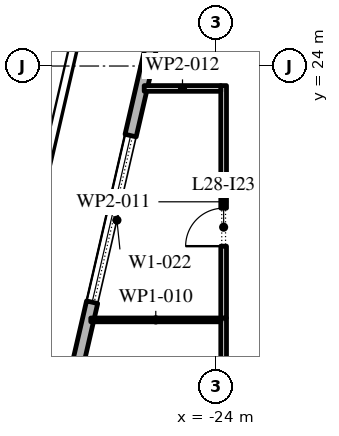
"""IFC4 building model, lengths in metres.
Left out: names, types, materials, properties, quantities, classifications, styles, units other than length and angle.
Written with IfcOpenShell. Run it as: python <this file> out.ifc"""

import sys

from ifc_helpers import new_model, si_unit, direction, frame, frame_2d, origin, place, context, subcontext, project, spatial, rectangle, extrude, element, fill, save


model = new_model("IFC4")
c1 = context("Model", 3, precision=1e-05, world=origin(), true_north=direction((0.0, 1.0)))
c2 = subcontext(c1, "Body", "Model", "MODEL_VIEW")
j1 = project(units=[si_unit("LENGTHUNIT", "METRE"), si_unit("PLANEANGLEUNIT", "RADIAN")], contexts=[c1])
p1 = place(None, origin())
s1 = spatial("IfcSite", under=j1, at=p1, CompositionType="ELEMENT")
p2 = place(p1, origin())
s2 = spatial("IfcBuilding", under=s1, at=p2, CompositionType="ELEMENT")
p3 = place(p2, frame((0.0, 0.0, 130.8)))
s3 = spatial("IfcBuildingStorey", under=s2, at=p3, CompositionType="ELEMENT", Elevation=130.8)
p4 = place(p3, frame((-22.82, 37.016, 0.0), z_axis=(0.0, 0.0, 1.0), x_axis=(-0.224953880882, -0.974369412223, 0.0)))
e1 = element("IfcWall", 1, at=p4, inside=s3, PredefinedType="STANDARD", context=c2, shape_type="SweptSolid", body=[
    extrude(rectangle(XDim=49.5, YDim=0.3, at=frame_2d((24.75, 0.0))), origin(), (0.0, 0.0, 1.0), 4.0),
])
p5 = place(p4, frame((1.157, 0.0, 0.45)))
e2 = element("IfcOpeningElement", 2, at=p5, cuts=e1, PredefinedType="OPENING", context=c2, shape_type="SweptSolid", body=[
    extrude(rectangle(XDim=4.5, YDim=3.05, at=frame_2d((2.25, 1.525))), frame((0.0, 0.16, 0.0), z_axis=(0.0, -1.0, 0.0), x_axis=(1.0, 0.0, 0.0)), (0.0, 0.0, 1.0), 0.32),
])
p6 = place(p4, frame((8.121, 0.0, 0.45)))
e3 = element("IfcOpeningElement", 3, at=p6, cuts=e1, PredefinedType="OPENING", context=c2, shape_type="SweptSolid", body=[
    extrude(rectangle(XDim=4.5, YDim=3.05, at=frame_2d((2.25, 1.525))), frame((0.0, 0.16, 0.0), z_axis=(0.0, -1.0, 0.0), x_axis=(1.0, 0.0, 0.0)), (0.0, 0.0, 1.0), 0.32),
])
p7 = place(p4, frame((15.236, 0.0, 0.45)))
e4 = element("IfcOpeningElement", 4, at=p7, cuts=e1, PredefinedType="OPENING", context=c2, shape_type="SweptSolid", body=[
    extrude(rectangle(XDim=4.5, YDim=3.05, at=frame_2d((2.25, 1.525))), frame((0.0, 0.16, 0.0), z_axis=(0.0, -1.0, 0.0), x_axis=(1.0, 0.0, 0.0)), (0.0, 0.0, 1.0), 0.32),
])
p8 = place(p4, frame((23.4, 0.0, 0.0)))
e5 = element("IfcOpeningElement", 5, at=p8, cuts=e1, PredefinedType="OPENING", context=c2, shape_type="SweptSolid", body=[
    extrude(rectangle(XDim=2.4, YDim=3.5, at=frame_2d((1.2, 1.75))), frame((0.0, 0.16, 0.0), z_axis=(0.0, -1.0, 0.0), x_axis=(1.0, 0.0, 0.0)), (0.0, 0.0, 1.0), 0.32),
])
p9 = place(p4, frame((29.464, 0.0, 0.45)))
e6 = element("IfcOpeningElement", 6, at=p9, cuts=e1, PredefinedType="OPENING", context=c2, shape_type="SweptSolid", body=[
    extrude(rectangle(XDim=4.5, YDim=2.875, at=frame_2d((2.25, 1.438))), frame((0.0, 0.16, 0.0), z_axis=(0.0, -1.0, 0.0), x_axis=(1.0, 0.0, 0.0)), (0.0, 0.0, 1.0), 0.32),
])
p10 = place(p4, frame((36.579, 0.0, 0.45)))
e7 = element("IfcOpeningElement", 7, at=p10, cuts=e1, PredefinedType="OPENING", context=c2, shape_type="SweptSolid", body=[
    extrude(rectangle(XDim=4.5, YDim=2.675, at=frame_2d((2.25, 1.337))), frame((0.0, 0.16, 0.0), z_axis=(0.0, -1.0, 0.0), x_axis=(1.0, 0.0, 0.0)), (0.0, 0.0, 1.0), 0.32),
])
p11 = place(p4, frame((43.693, 0.0, 0.45)))
e8 = element("IfcOpeningElement", 8, at=p11, cuts=e1, PredefinedType="OPENING", context=c2, shape_type="SweptSolid", body=[
    extrude(rectangle(XDim=4.5, YDim=3.05, at=frame_2d((2.25, 1.525))), frame((0.0, 0.16, 0.0), z_axis=(0.0, -1.0, 0.0), x_axis=(1.0, 0.0, 0.0)), (0.0, 0.0, 1.0), 0.32),
])
p12 = place(p3, frame((-23.8, 9.55, 0.0), z_axis=(0.0, 0.0, 1.0), x_axis=(0.0, 1.0, 0.0)))
e9 = element("IfcWall", 9, at=p12, inside=s3, PredefinedType="PARTITIONING", context=c2, shape_type="SweptSolid", body=[
    extrude(rectangle(XDim=7.82, YDim=0.15, at=frame_2d((3.91, 0.0))), origin(), (0.0, 0.0, 1.0), 4.0),
])
p13 = place(p12, frame((1.87, 0.0, 0.0)))
e10 = element("IfcOpeningElement", 10, at=p13, cuts=e9, PredefinedType="OPENING", context=c2, shape_type="SweptSolid", body=[
    extrude(rectangle(XDim=1.0, YDim=2.1, at=frame_2d((0.5, 1.05))), frame((0.0, 0.085, 0.0), z_axis=(0.0, -1.0, 0.0), x_axis=(1.0, 0.0, 0.0)), (0.0, 0.0, 1.0), 0.17),
])
p14 = place(p3, frame((-23.875, 17.32, 0.0), z_axis=(0.0, 0.0, 1.0), x_axis=(-1.0, 0.0, 0.0)))
e11 = element("IfcWall", 11, at=p14, inside=s3, PredefinedType="PARTITIONING", context=c2, shape_type="SweptSolid", body=[
    extrude(rectangle(XDim=3.421, YDim=0.1, at=frame_2d((1.71, 0.0))), origin(), (0.0, 0.0, 1.0), 4.0),
])
p15 = place(p3, frame((-23.8, 17.37, 0.0), z_axis=(0.0, 0.0, 1.0), x_axis=(0.0, 1.0, 0.0)))
e12 = element("IfcWall", 12, at=p15, inside=s3, PredefinedType="PARTITIONING", context=c2, shape_type="SweptSolid", body=[
    extrude(rectangle(XDim=6.115, YDim=0.15, at=frame_2d((3.058, 0.0))), origin(), (0.0, 0.0, 1.0), 4.0),
])
p16 = place(p15, frame((1.89, 0.0, 0.0)))
e13 = element("IfcOpeningElement", 13, at=p16, cuts=e12, PredefinedType="OPENING", context=c2, shape_type="SweptSolid", body=[
    extrude(rectangle(XDim=1.0, YDim=2.1, at=frame_2d((0.5, 1.05))), frame((0.0, 0.085, 0.0), z_axis=(0.0, -1.0, 0.0), x_axis=(1.0, 0.0, 0.0)), (0.0, 0.0, 1.0), 0.17),
])
p17 = place(p3, frame((-23.875, 23.41, 0.0), z_axis=(0.0, 0.0, 1.0), x_axis=(-1.0, 0.0, 0.0)))
e14 = element("IfcWall", 14, at=p17, inside=s3, PredefinedType="PARTITIONING", context=c2, shape_type="SweptSolid", body=[
    extrude(rectangle(XDim=2.015, YDim=0.15, at=frame_2d((1.007, 0.0))), origin(), (0.0, 0.0, 1.0), 4.0),
])
p18 = place(p7, origin())
e15 = element("IfcWindow", 15, at=p18, inside=s3, PartitioningType="DOUBLE_PANEL_VERTICAL", PredefinedType="WINDOW", context=c2, shape_type="SweptSolid", body=[
    extrude(rectangle(XDim=4.5, YDim=3.05, at=frame_2d((2.25, 1.525))), frame((0.0, 0.03, 0.0), z_axis=(0.0, -1.0, 0.0), x_axis=(1.0, 0.0, 0.0)), (0.0, 0.0, 1.0), 0.06),
])
fill(e4, e15)
p19 = place(p16, origin())
e16 = element("IfcDoor", 16, at=p19, inside=s3, OperationType="SINGLE_SWING_RIGHT", PredefinedType="DOOR", context=c2, shape_type="SweptSolid", body=[
    extrude(rectangle(XDim=1.0, YDim=2.1, at=frame_2d((0.5, 1.05))), frame((0.0, 0.025, 0.0), z_axis=(0.0, -1.0, 0.0), x_axis=(1.0, 0.0, 0.0)), (0.0, 0.0, 1.0), 0.05),
])
fill(e13, e16)
save(model, sys.argv[1])
